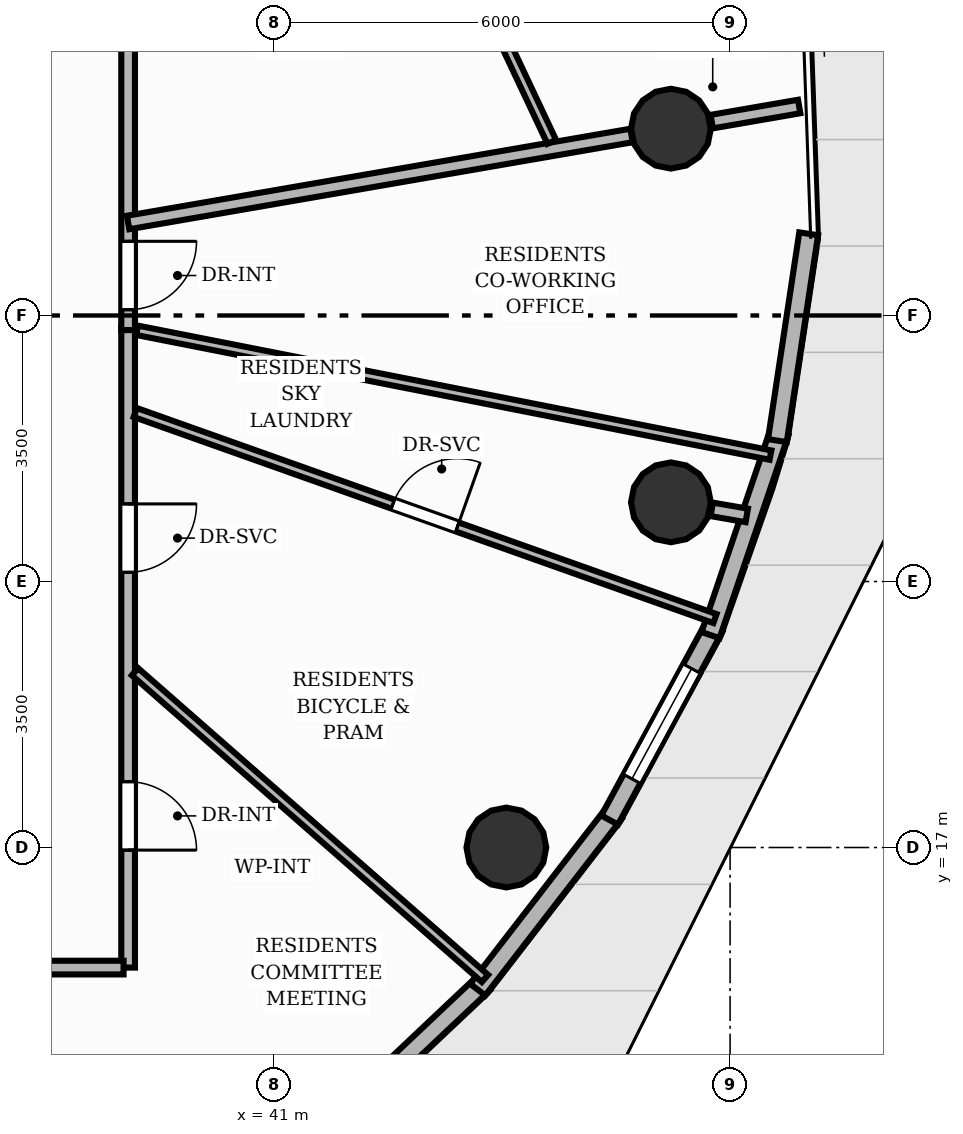
"""IFC4 building model, lengths in metres.
Left out: names, types, materials, properties, quantities, classifications, styles, units other than length and angle.
Written with IfcOpenShell. Run it as: python <this file> out.ifc"""

import sys

from ifc_helpers import new_model, si_unit, direction, frame, frame_2d, origin, origin_2d, place, context, subcontext, project, spatial, rectangle, circle, extrude, element, fill, save


model = new_model("IFC4")
c1 = context("Model", 3, precision=1e-05, world=origin(), true_north=direction((0.0, 1.0)))
c2 = subcontext(c1, "Body", "Model", "MODEL_VIEW")
j1 = project(units=[si_unit("LENGTHUNIT", "METRE"), si_unit("PLANEANGLEUNIT", "RADIAN")], contexts=[c1])
p1 = place(None, origin())
s1 = spatial("IfcSite", under=j1, at=p1, CompositionType="ELEMENT")
p2 = place(p1, origin())
s2 = spatial("IfcBuilding", under=s1, at=p2, CompositionType="ELEMENT")
p3 = place(p2, frame((0.0, 0.0, 126.56)))
s3 = spatial("IfcBuildingStorey", under=s2, at=p3, CompositionType="ELEMENT", Elevation=126.56)
for number, where, z_axis, x_axis in (
    (1, (46.221, 26.458, 0.0), (0.0, 0.0, 1.0), (1.0, 0.0, 0.0)),
    (2, (44.056, 17.0, 0.0), (0.0, 0.0, 1.0), (1.0, 0.0, 0.0)),
    (3, (46.221, 21.542, 0.0), (0.0, 0.0, 1.0), (1.0, 0.0, 0.0)),
):
    element("IfcColumn", number, at=place(p3, frame(where, z_axis=z_axis, x_axis=x_axis)), inside=s3, PredefinedType="COLUMN", context=c2, shape_type="SweptSolid", body=[
        extrude(circle(Radius=0.525, at=origin_2d()), origin(), (0.0, 0.0, 1.0), 3.2),
    ])
p4 = place(p3, frame((43.753, 15.211, 0.0), z_axis=(0.0, 0.0, 1.0), x_axis=(-0.727113217486, -0.686517566386, 0.0)))
e4 = element("IfcWall", 4, at=p4, inside=s3, PredefinedType="SOLIDWALL", context=c2, shape_type="SweptSolid", body=[
    extrude(rectangle(XDim=2.977, YDim=0.25, at=frame_2d((1.488, 0.0))), origin(), (0.0, 0.0, 1.0), 2.96),
])
p5 = place(p3, frame((45.475, 17.454, 0.0), z_axis=(0.0, 0.0, 1.0), x_axis=(-0.611416743811, -0.791308767415, 0.0)))
e5 = element("IfcWall", 5, at=p5, inside=s3, PredefinedType="SOLIDWALL", context=c2, shape_type="SweptSolid", body=[
    extrude(rectangle(XDim=2.937, YDim=0.25, at=frame_2d((1.468, 0.0))), origin(), (0.0, 0.0, 1.0), 2.96),
])
p6 = place(p3, frame((46.787, 19.896, 0.0), z_axis=(0.0, 0.0, 1.0), x_axis=(-0.476018404115, -0.879435318226, 0.0)))
e6 = element("IfcWall", 6, at=p6, inside=s3, PredefinedType="SOLIDWALL", context=c2, shape_type="SweptSolid", body=[
    extrude(rectangle(XDim=2.882, YDim=0.25, at=frame_2d((1.441, 0.0))), origin(), (0.0, 0.0, 1.0), 2.96),
])
p7 = place(p6, frame((0.616, 0.0, 0.85)))
e7 = element("IfcOpeningElement", 7, at=p7, cuts=e6, PredefinedType="OPENING", context=c2, shape_type="SweptSolid", body=[
    extrude(rectangle(XDim=1.65, YDim=1.55, at=frame_2d((0.825, 0.775))), frame((0.0, 0.135, 0.0), z_axis=(0.0, -1.0, 0.0), x_axis=(1.0, 0.0, 0.0)), (0.0, 0.0, 1.0), 0.27),
])
p8 = place(p3, frame((47.649, 22.462, 0.0), z_axis=(0.0, 0.0, 1.0), x_axis=(-0.321473951892, -0.946918422175, 0.0)))
e8 = element("IfcWall", 8, at=p8, inside=s3, PredefinedType="SOLIDWALL", context=c2, shape_type="SweptSolid", body=[
    extrude(rectangle(XDim=2.818, YDim=0.25, at=frame_2d((1.409, 0.0))), origin(), (0.0, 0.0, 1.0), 2.96),
])
p9 = place(p3, frame((48.034, 25.075, 0.0), z_axis=(0.0, 0.0, 1.0), x_axis=(-0.149576734229, -0.988750120393, 0.0)))
e9 = element("IfcWall", 9, at=p9, inside=s3, PredefinedType="SOLIDWALL", context=c2, shape_type="SweptSolid", body=[
    extrude(rectangle(XDim=2.752, YDim=0.25, at=frame_2d((1.376, 0.0))), origin(), (0.0, 0.0, 1.0), 2.96),
])
p10 = place(p3, frame((46.758, 26.551, 0.0), z_axis=(0.0, 0.0, 1.0), x_axis=(0.98537549431, 0.170396992969, 0.0)))
e10 = element("IfcWall", 10, at=p10, inside=s3, PredefinedType="PARTITIONING", context=c2, shape_type="SweptSolid", body=[
    extrude(rectangle(XDim=1.168, YDim=0.18, at=frame_2d((0.584, 0.0))), origin(), (0.0, 0.0, 1.0), 2.336),
])
p11 = place(p3, frame((46.758, 21.449, 0.0), z_axis=(0.0, 0.0, 1.0), x_axis=(0.985345448397, -0.170570651999, 0.0)))
e11 = element("IfcWall", 11, at=p11, inside=s3, PredefinedType="PARTITIONING", context=c2, shape_type="SweptSolid", body=[
    extrude(rectangle(XDim=0.468, YDim=0.18, at=frame_2d((0.234, 0.0))), origin(), (0.0, 0.0, 1.0), 2.336),
])
p12 = place(p3, frame((39.08, 23.848, 0.0), z_axis=(0.0, 0.0, 1.0), x_axis=(0.0, -1.0, 0.0)))
e12 = element("IfcWall", 12, at=p12, inside=s3, PredefinedType="PARTITIONING", context=c2, shape_type="SweptSolid", body=[
    extrude(rectangle(XDim=8.428, YDim=0.18, at=frame_2d((4.214, 0.0))), origin(), (0.0, 0.0, 1.0), 2.955),
])
p13 = place(p12, frame((2.327, 0.0, 0.0)))
e13 = element("IfcOpeningElement", 13, at=p13, cuts=e12, PredefinedType="OPENING", context=c2, shape_type="SweptSolid", body=[
    extrude(rectangle(XDim=0.9, YDim=2.1, at=frame_2d((0.45, 1.05))), frame((0.0, 0.1, 0.0), z_axis=(0.0, -1.0, 0.0), x_axis=(1.0, 0.0, 0.0)), (0.0, 0.0, 1.0), 0.2),
])
p14 = place(p12, frame((5.983, 0.0, 0.0)))
e14 = element("IfcOpeningElement", 14, at=p14, cuts=e12, PredefinedType="OPENING", context=c2, shape_type="SweptSolid", body=[
    extrude(rectangle(XDim=0.9, YDim=2.1, at=frame_2d((0.45, 1.05))), frame((0.0, 0.1, 0.0), z_axis=(0.0, -1.0, 0.0), x_axis=(1.0, 0.0, 0.0)), (0.0, 0.0, 1.0), 0.2),
])
p15 = place(p3, frame((39.02, 15.42, 0.0), z_axis=(0.0, 0.0, 1.0), x_axis=(-1.0, 0.0, 0.0)))
e15 = element("IfcWall", 15, at=p15, inside=s3, PredefinedType="PARTITIONING", context=c2, shape_type="SweptSolid", body=[
    extrude(rectangle(XDim=9.922, YDim=0.18, at=frame_2d((4.961, 0.0))), origin(), (0.0, 0.0, 1.0), 2.955),
])
p16 = place(p15, frame((3.487, 0.0, 0.0)))
e16 = element("IfcOpeningElement", 16, at=p16, cuts=e15, PredefinedType="OPENING", context=c2, shape_type="SweptSolid", body=[
    extrude(rectangle(XDim=0.9, YDim=2.1, at=frame_2d((0.45, 1.05))), frame((0.0, 0.1, 0.0), z_axis=(0.0, -1.0, 0.0), x_axis=(1.0, 0.0, 0.0)), (0.0, 0.0, 1.0), 0.2),
])
p17 = place(p15, frame((6.571, 0.0, 0.0)))
e17 = element("IfcOpeningElement", 17, at=p17, cuts=e15, PredefinedType="OPENING", context=c2, shape_type="SweptSolid", body=[
    extrude(rectangle(XDim=0.9, YDim=2.1, at=frame_2d((0.45, 1.05))), frame((0.0, 0.1, 0.0), z_axis=(0.0, -1.0, 0.0), x_axis=(1.0, 0.0, 0.0)), (0.0, 0.0, 1.0), 0.2),
])
p18 = place(p3, frame((39.08, 30.158, 0.0), z_axis=(0.0, 0.0, 1.0), x_axis=(0.0, -1.0, 0.0)))
e18 = element("IfcWall", 18, at=p18, inside=s3, PredefinedType="PARTITIONING", context=c2, shape_type="SweptSolid", body=[
    extrude(rectangle(XDim=6.35, YDim=0.18, at=frame_2d((3.175, 0.0))), origin(), (0.0, 0.0, 1.0), 2.955),
])
p19 = place(p18, frame((5.182, 0.0, 0.0)))
e19 = element("IfcOpeningElement", 19, at=p19, cuts=e18, PredefinedType="OPENING", context=c2, shape_type="SweptSolid", body=[
    extrude(rectangle(XDim=0.9, YDim=2.1, at=frame_2d((0.45, 1.05))), frame((0.0, 0.1, 0.0), z_axis=(0.0, -1.0, 0.0), x_axis=(1.0, 0.0, 0.0)), (0.0, 0.0, 1.0), 0.2),
])
p20 = place(p3, frame((43.775, 15.277, 0.0), z_axis=(0.0, 0.0, 1.0), x_axis=(-0.752092313191, 0.659057776252, 0.0)))
e20 = element("IfcWall", 20, at=p20, inside=s3, PredefinedType="PARTITIONING", context=c2, shape_type="SweptSolid", body=[
    extrude(rectangle(XDim=6.122, YDim=0.125, at=frame_2d((3.061, 0.0))), origin(), (0.0, 0.0, 1.0), 2.955),
])
p21 = place(p3, frame((39.174, 22.723, 0.0), z_axis=(0.0, 0.0, 1.0), x_axis=(0.942245152982, -0.334923978959, 0.0)))
e21 = element("IfcWall", 21, at=p21, inside=s3, PredefinedType="PARTITIONING", context=c2, shape_type="SweptSolid", body=[
    extrude(rectangle(XDim=8.094, YDim=0.125, at=frame_2d((4.047, 0.0))), origin(), (0.0, 0.0, 1.0), 2.336),
])
p22 = place(p21, frame((3.597, 0.0, 0.0)))
e22 = element("IfcOpeningElement", 22, at=p22, cuts=e21, PredefinedType="OPENING", context=c2, shape_type="SweptSolid", body=[
    extrude(rectangle(XDim=0.9, YDim=2.1, at=frame_2d((0.45, 1.05))), frame((0.0, 0.073, 0.0), z_axis=(0.0, -1.0, 0.0), x_axis=(1.0, 0.0, 0.0)), (0.0, 0.0, 1.0), 0.145),
])
p23 = place(p3, frame((47.531, 22.163, 0.0), z_axis=(0.0, 0.0, 1.0), x_axis=(-0.981139353497, 0.19330175638, 0.0)))
e23 = element("IfcWall", 23, at=p23, inside=s3, PredefinedType="PARTITIONING", context=c2, shape_type="SweptSolid", body=[
    extrude(rectangle(XDim=8.494, YDim=0.125, at=frame_2d((4.247, 0.0))), origin(), (0.0, 0.0, 1.0), 2.692),
])
p24 = place(p3, frame((39.08, 25.224, 0.0), z_axis=(0.0, 0.0, 1.0), x_axis=(0.985384524795, 0.17034476304, 0.0)))
e24 = element("IfcWall", 24, at=p24, inside=s3, PredefinedType="PARTITIONING", context=c2, shape_type="SweptSolid", body=[
    extrude(rectangle(XDim=6.722, YDim=0.18, at=frame_2d((3.361, 0.0))), origin(), (0.0, 0.0, 1.0), 2.336),
])
p25 = place(p3, frame((44.653, 26.285, 0.0), z_axis=(0.0, 0.0, 1.0), x_axis=(-0.426326363779, 0.90456941776, 0.0)))
e25 = element("IfcWall", 25, at=p25, inside=s3, PredefinedType="PARTITIONING", context=c2, shape_type="SweptSolid", body=[
    extrude(rectangle(XDim=6.729, YDim=0.125, at=frame_2d((3.365, 0.0))), origin(), (0.0, 0.0, 1.0), 2.955),
])
p26 = place(p7, origin())
e26 = element("IfcWindow", 26, at=p26, inside=s3, PartitioningType="SINGLE_PANEL", PredefinedType="WINDOW", context=c2, shape_type="SweptSolid", body=[
    extrude(rectangle(XDim=1.65, YDim=1.55, at=frame_2d((0.825, 0.775))), frame((0.0, 0.03, 0.0), z_axis=(0.0, -1.0, 0.0), x_axis=(1.0, 0.0, 0.0)), (0.0, 0.0, 1.0), 0.06),
])
fill(e7, e26)
p27 = place(p13, origin())
e27 = element("IfcDoor", 27, at=p27, inside=s3, OperationType="SINGLE_SWING_LEFT", PredefinedType="DOOR", context=c2, shape_type="SweptSolid", body=[
    extrude(rectangle(XDim=0.9, YDim=2.1, at=frame_2d((0.45, 1.05))), frame((0.0, 0.025, 0.0), z_axis=(0.0, -1.0, 0.0), x_axis=(1.0, 0.0, 0.0)), (0.0, 0.0, 1.0), 0.05),
])
fill(e13, e27)
p28 = place(p14, origin())
e28 = element("IfcDoor", 28, at=p28, inside=s3, OperationType="SINGLE_SWING_RIGHT", PredefinedType="DOOR", context=c2, shape_type="SweptSolid", body=[
    extrude(rectangle(XDim=0.9, YDim=2.1, at=frame_2d((0.45, 1.05))), frame((0.0, 0.025, 0.0), z_axis=(0.0, -1.0, 0.0), x_axis=(1.0, 0.0, 0.0)), (0.0, 0.0, 1.0), 0.05),
])
fill(e14, e28)
p29 = place(p19, origin())
e29 = element("IfcDoor", 29, at=p29, inside=s3, OperationType="SINGLE_SWING_LEFT", PredefinedType="DOOR", context=c2, shape_type="SweptSolid", body=[
    extrude(rectangle(XDim=0.9, YDim=2.1, at=frame_2d((0.45, 1.05))), frame((0.0, 0.025, 0.0), z_axis=(0.0, -1.0, 0.0), x_axis=(1.0, 0.0, 0.0)), (0.0, 0.0, 1.0), 0.05),
])
fill(e19, e29)
p30 = place(p22, origin())
e30 = element("IfcDoor", 30, at=p30, inside=s3, OperationType="SINGLE_SWING_RIGHT", PredefinedType="DOOR", context=c2, shape_type="SweptSolid", body=[
    extrude(rectangle(XDim=0.9, YDim=2.1, at=frame_2d((0.45, 1.05))), frame((0.0, 0.025, 0.0), z_axis=(0.0, -1.0, 0.0), x_axis=(1.0, 0.0, 0.0)), (0.0, 0.0, 1.0), 0.05),
])
fill(e22, e30)
save(model, sys.argv[1])
